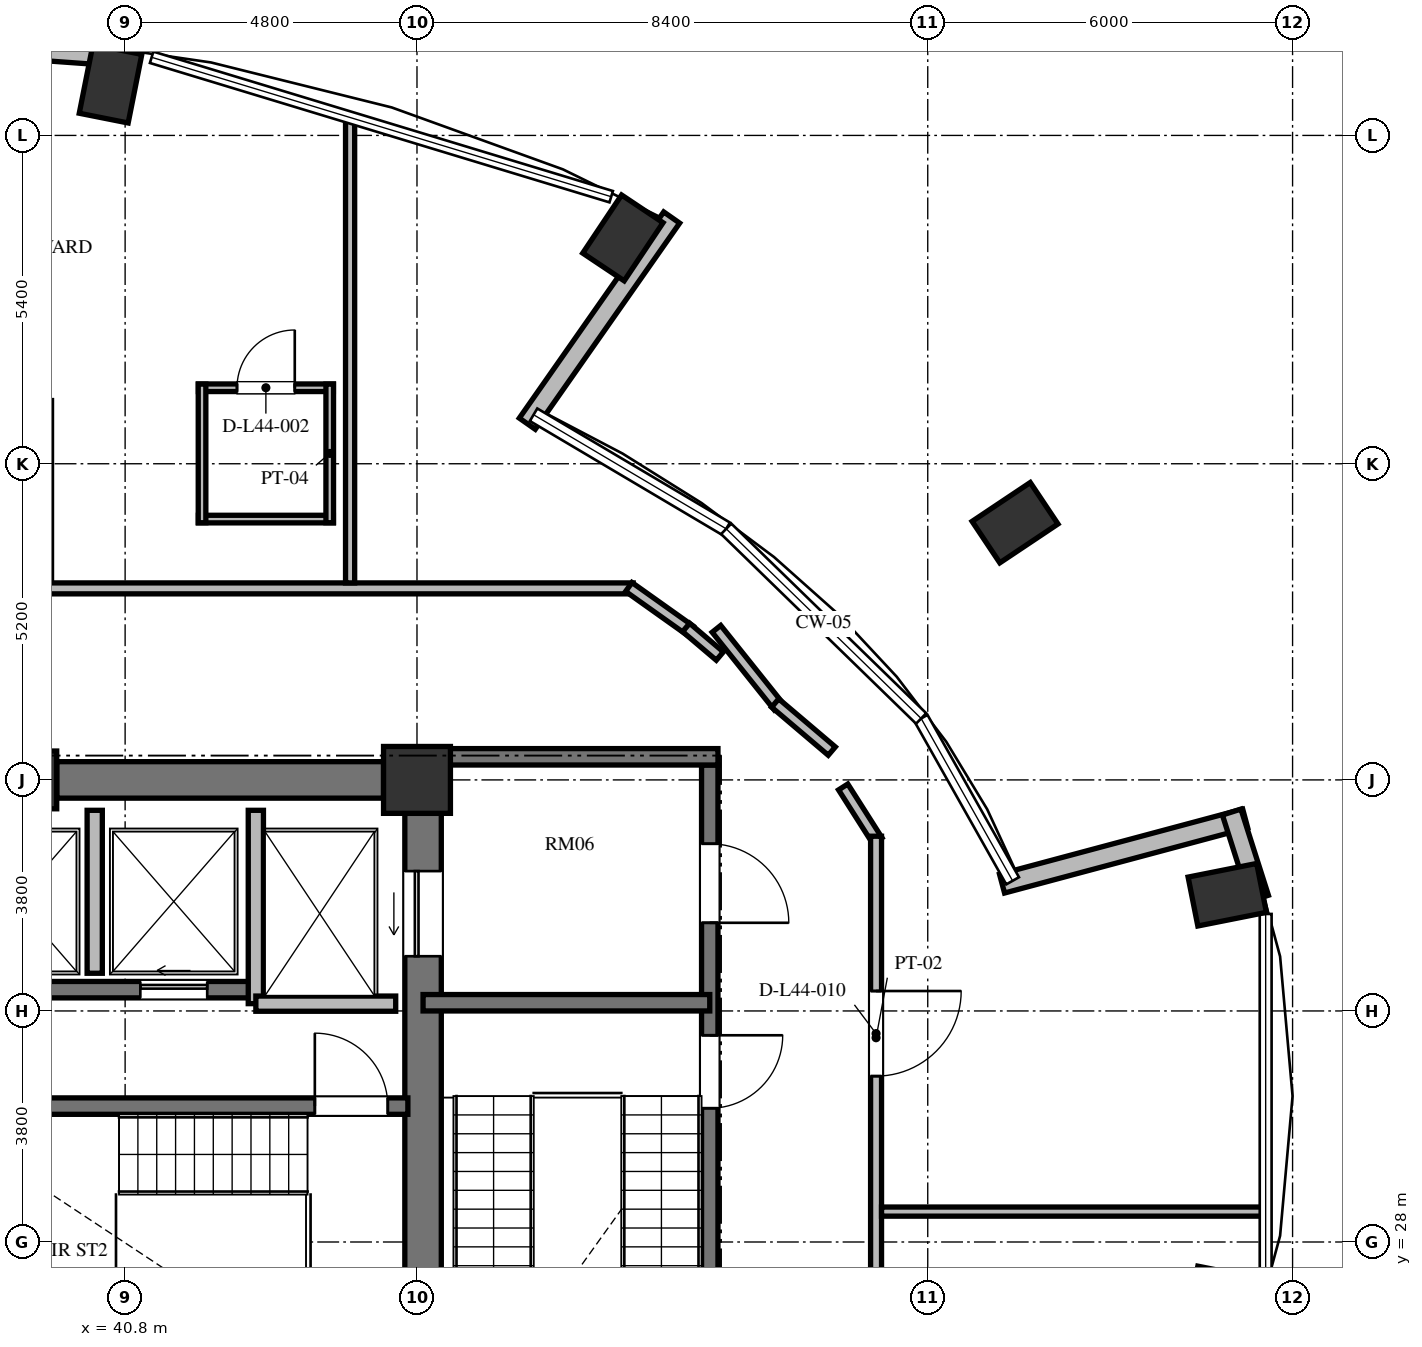
"""IFC4 building model, lengths in metres.
Left out: names, types, materials, properties, quantities, classifications, styles, units other than length and angle.
Written with IfcOpenShell. Run it as: python <this file> out.ifc"""

import sys

from ifc_helpers import new_model, si_unit, direction, frame, frame_2d, origin, origin_2d, place, context, subcontext, project, spatial, rectangle, extrude, element, fill, save


model = new_model("IFC4")
c1 = context("Model", 3, precision=1e-05, world=origin(), true_north=direction((0.0, 1.0)))
c2 = subcontext(c1, "Body", "Model", "MODEL_VIEW")
j1 = project(units=[si_unit("LENGTHUNIT", "METRE"), si_unit("PLANEANGLEUNIT", "RADIAN")], contexts=[c1])
p1 = place(None, origin())
s1 = spatial("IfcSite", under=j1, at=p1, CompositionType="ELEMENT")
p2 = place(p1, origin())
s2 = spatial("IfcBuilding", under=s1, at=p2, CompositionType="ELEMENT")
p3 = place(p2, frame((0.0, 0.0, 171.12)))
s3 = spatial("IfcBuildingStorey", under=s2, at=p3, CompositionType="ELEMENT", Elevation=171.12)
for number, where, z_axis, x_axis in (
    (1, (58.926, 27.088, 0.0), (0.0, 0.0, 1.0), (0.981, -0.195, 0.0)),
    (2, (58.926, 33.712, 0.0), (0.0, 0.0, 1.0), (0.981, 0.195, 0.0)),
    (3, (55.436, 39.831, 0.0), (0.0, 0.0, 1.0), (0.831, 0.556, 0.0)),
    (4, (48.987, 44.514, 0.0), (0.0, 0.0, 1.0), (0.556, 0.831, 0.0)),
    (5, (40.56, 47.049, 0.0), (0.0, 0.0, 1.0), (0.195, 0.981, 0.0)),
):
    element("IfcColumn", number, at=place(p3, frame(where, z_axis=z_axis, x_axis=x_axis)), inside=s3, PredefinedType="COLUMN", context=c2, shape_type="SweptSolid", body=[
        extrude(rectangle(XDim=1.15, YDim=0.82, at=origin_2d()), origin(), (0.0, 0.0, 1.0), 3.648),
    ])
p4 = place(p3, frame((45.6, 35.6, 0.0), z_axis=(0.0, 0.0, 1.0), x_axis=(1.0, 0.0, 0.0)))
e6 = element("IfcColumn", 6, at=p4, inside=s3, PredefinedType="COLUMN", context=c2, shape_type="SweptSolid", body=[
    extrude(rectangle(XDim=1.1, YDim=1.1, at=origin_2d()), origin(), (0.0, 0.0, 1.0), 3.648),
])
p5 = place(p3, frame((39.2, 35.6, 0.0), z_axis=(0.0, 0.0, 1.0), x_axis=(1.0, 0.0, 0.0)))
e7 = element("IfcColumn", 7, at=p5, inside=s3, PredefinedType="COLUMN", context=c2, shape_type="SweptSolid", body=[
    extrude(rectangle(XDim=0.95, YDim=0.95, at=origin_2d()), origin(), (0.0, 0.0, 1.0), 3.648),
])
p6 = place(p3, frame((45.7, 20.95, 0.0), z_axis=(0.0, 0.0, 1.0), x_axis=(0.0, 1.0, 0.0)))
e8 = element("IfcWall", 8, at=p6, inside=s3, PredefinedType="SHEAR", context=c2, shape_type="SweptSolid", body=[
    extrude(rectangle(XDim=14.1, YDim=0.6, at=frame_2d((7.05, 0.0))), origin(), (0.0, 0.0, 1.0), 3.648),
])
p7 = place(p6, frame((11.75, 0.0, 0.0)))
e9 = element("IfcOpeningElement", 9, at=p7, cuts=e8, PredefinedType="OPENING", context=c2, shape_type="SweptSolid", body=[
    extrude(rectangle(XDim=1.4, YDim=2.3, at=frame_2d((0.7, 1.15))), frame((0.0, 0.31, 0.0), z_axis=(0.0, -1.0, 0.0), x_axis=(1.0, 0.0, 0.0)), (0.0, 0.0, 1.0), 0.62),
])
p8 = place(p6, frame((0.95, 0.0, 0.0)))
e10 = element("IfcOpeningElement", 10, at=p8, cuts=e8, PredefinedType="OPENING", context=c2, shape_type="SweptSolid", body=[
    extrude(rectangle(XDim=1.4, YDim=2.3, at=frame_2d((0.7, 1.15))), frame((0.0, 0.31, 0.0), z_axis=(0.0, -1.0, 0.0), x_axis=(1.0, 0.0, 0.0)), (0.0, 0.0, 1.0), 0.62),
])
p9 = place(p3, frame((39.675, 35.6, 0.0), z_axis=(0.0, 0.0, 1.0), x_axis=(1.0, 0.0, 0.0)))
e11 = element("IfcWall", 11, at=p9, inside=s3, PredefinedType="SHEAR", context=c2, shape_type="SweptSolid", body=[
    extrude(rectangle(XDim=5.375, YDim=0.6, at=frame_2d((2.688, 0.0))), origin(), (0.0, 0.0, 1.0), 3.648),
])
p10 = place(p3, frame((40.701, 47.501, 0.0), z_axis=(0.0, 0.0, 1.0), x_axis=(-0.997415460462, 0.071849838072, 0.0)))
e12 = element("IfcWall", 12, at=p10, inside=s3, PredefinedType="SOLIDWALL", context=c2, shape_type="SweptSolid", body=[
    extrude(rectangle(XDim=4.893, YDim=0.32, at=frame_2d((2.447, 0.0))), origin(), (0.0, 0.0, 1.0), 3.428),
])
p11 = place(p10, frame((1.846, 0.0, 0.85)))
e13 = element("IfcOpeningElement", 13, at=p11, cuts=e12, PredefinedType="OPENING", context=c2, shape_type="SweptSolid", body=[
    extrude(rectangle(XDim=1.2, YDim=2.2, at=frame_2d((0.6, 1.1))), frame((0.0, 0.17, 0.0), z_axis=(0.0, -1.0, 0.0), x_axis=(1.0, 0.0, 0.0)), (0.0, 0.0, 1.0), 0.34),
])
p12 = place(p3, frame((59.221, 34.966, 0.0), z_axis=(0.0, 0.0, 1.0), x_axis=(-0.965925940868, -0.258818617489, 0.0)))
e14 = element("IfcWall", 14, at=p12, inside=s3, PredefinedType="SOLIDWALL", context=c2, shape_type="SweptSolid", body=[
    extrude(rectangle(XDim=4.14, YDim=0.32, at=frame_2d((2.07, 0.0))), origin(), (0.0, 0.0, 1.0), 3.428),
])
p13 = place(p3, frame((49.789, 44.85, 0.0), z_axis=(0.0, 0.0, 1.0), x_axis=(-0.57355337011, -0.819168194961, 0.0)))
e15 = element("IfcWall", 15, at=p13, inside=s3, PredefinedType="SOLIDWALL", context=c2, shape_type="SweptSolid", body=[
    extrude(rectangle(XDim=4.14, YDim=0.32, at=frame_2d((2.07, 0.0))), origin(), (0.0, 0.0, 1.0), 2.863),
])
p14 = place(p3, frame((59.45, 33.654, 0.0), z_axis=(0.0, 0.0, 1.0), x_axis=(-0.303745470451, 0.952753215256, 0.0)))
e16 = element("IfcWall", 16, at=p14, inside=s3, PredefinedType="SOLIDWALL", context=c2, shape_type="SweptSolid", body=[
    extrude(rectangle(XDim=1.488, YDim=0.32, at=frame_2d((0.744, 0.0))), origin(), (0.0, 0.0, 1.0), 3.428),
])
p15 = place(p3, frame((37.465, 30.235, 0.0), z_axis=(0.0, 0.0, 1.0), x_axis=(1.0, 0.0, 0.0)))
e17 = element("IfcWall", 17, at=p15, inside=s3, PredefinedType="SHEAR", context=c2, shape_type="SweptSolid", body=[
    extrude(rectangle(XDim=7.985, YDim=0.27, at=frame_2d((3.992, 0.0))), origin(), (0.0, 0.0, 1.0), 3.648),
])
p16 = place(p15, frame((6.455, 0.0, 0.0)))
e18 = element("IfcOpeningElement", 18, at=p16, cuts=e17, PredefinedType="OPENING", context=c2, shape_type="SweptSolid", body=[
    extrude(rectangle(XDim=1.2, YDim=2.15, at=frame_2d((0.6, 1.075))), frame((0.0, 0.145, 0.0), z_axis=(0.0, -1.0, 0.0), x_axis=(1.0, 0.0, 0.0)), (0.0, 0.0, 1.0), 0.29),
])
p17 = place(p3, frame((26.55, 32.15, 0.0), z_axis=(0.0, 0.0, 1.0), x_axis=(1.0, 0.0, 0.0)))
e19 = element("IfcWall", 19, at=p17, inside=s3, PredefinedType="SHEAR", context=c2, shape_type="SweptSolid", body=[
    extrude(rectangle(XDim=16.4, YDim=0.27, at=frame_2d((8.2, 0.0))), origin(), (0.0, 0.0, 1.0), 3.648),
])
p18 = place(p17, frame((2.425, 0.0, 0.0)))
e20 = element("IfcOpeningElement", 20, at=p18, cuts=e19, PredefinedType="OPENING", context=c2, shape_type="SweptSolid", body=[
    extrude(rectangle(XDim=1.05, YDim=2.15, at=frame_2d((0.525, 1.075))), frame((0.0, 0.145, 0.0), z_axis=(0.0, -1.0, 0.0), x_axis=(1.0, 0.0, 0.0)), (0.0, 0.0, 1.0), 0.29),
])
p19 = place(p17, frame((6.5, 0.0, 0.0)))
e21 = element("IfcOpeningElement", 21, at=p19, cuts=e19, PredefinedType="OPENING", context=c2, shape_type="SweptSolid", body=[
    extrude(rectangle(XDim=1.1, YDim=2.2, at=frame_2d((0.55, 1.1))), frame((0.0, 0.145, 0.0), z_axis=(0.0, -1.0, 0.0), x_axis=(1.0, 0.0, 0.0)), (0.0, 0.0, 1.0), 0.29),
])
p20 = place(p17, frame((9.1, 0.0, 0.0)))
e22 = element("IfcOpeningElement", 22, at=p20, cuts=e19, PredefinedType="OPENING", context=c2, shape_type="SweptSolid", body=[
    extrude(rectangle(XDim=1.1, YDim=2.2, at=frame_2d((0.55, 1.1))), frame((0.0, 0.145, 0.0), z_axis=(0.0, -1.0, 0.0), x_axis=(1.0, 0.0, 0.0)), (0.0, 0.0, 1.0), 0.29),
])
p21 = place(p17, frame((11.9, 0.0, 0.0)))
e23 = element("IfcOpeningElement", 23, at=p21, cuts=e19, PredefinedType="OPENING", context=c2, shape_type="SweptSolid", body=[
    extrude(rectangle(XDim=1.1, YDim=2.2, at=frame_2d((0.55, 1.1))), frame((0.0, 0.145, 0.0), z_axis=(0.0, -1.0, 0.0), x_axis=(1.0, 0.0, 0.0)), (0.0, 0.0, 1.0), 0.29),
])
p22 = place(p17, frame((14.5, 0.0, 0.0)))
e24 = element("IfcOpeningElement", 24, at=p22, cuts=e19, PredefinedType="OPENING", context=c2, shape_type="SweptSolid", body=[
    extrude(rectangle(XDim=1.1, YDim=2.2, at=frame_2d((0.55, 1.1))), frame((0.0, 0.145, 0.0), z_axis=(0.0, -1.0, 0.0), x_axis=(1.0, 0.0, 0.0)), (0.0, 0.0, 1.0), 0.29),
])
p23 = place(p3, frame((42.95, 31.92, 0.0), z_axis=(0.0, 0.0, 1.0), x_axis=(0.0, 1.0, 0.0)))
e25 = element("IfcWall", 25, at=p23, inside=s3, PredefinedType="SOLIDWALL", context=c2, shape_type="SweptSolid", body=[
    extrude(rectangle(XDim=3.18, YDim=0.25, at=frame_2d((1.59, 0.0))), origin(), (0.0, 0.0, 1.0), 3.428),
])
p24 = place(p3, frame((42.95, 31.92, 0.0), z_axis=(0.0, 0.0, 1.0), x_axis=(1.0, 0.0, 0.0)))
e26 = element("IfcWall", 26, at=p24, inside=s3, PredefinedType="SOLIDWALL", context=c2, shape_type="SweptSolid", body=[
    extrude(rectangle(XDim=2.3, YDim=0.25, at=frame_2d((1.15, 0.0))), origin(), (0.0, 0.0, 1.0), 3.428),
])
p25 = place(p3, frame((40.3, 32.42, 0.0), z_axis=(0.0, 0.0, 1.0), x_axis=(0.0, 1.0, 0.0)))
e27 = element("IfcWall", 27, at=p25, inside=s3, PredefinedType="SOLIDWALL", context=c2, shape_type="SweptSolid", body=[
    extrude(rectangle(XDim=2.68, YDim=0.25, at=frame_2d((1.34, 0.0))), origin(), (0.0, 0.0, 1.0), 3.428),
])
p26 = place(p3, frame((50.415, 35.845, 0.0), z_axis=(0.0, 0.0, 1.0), x_axis=(0.0, -1.0, 0.0)))
e28 = element("IfcWall", 28, at=p26, inside=s3, PredefinedType="SHEAR", context=c2, shape_type="SweptSolid", body=[
    extrude(rectangle(XDim=15.825, YDim=0.27, at=frame_2d((7.913, 0.0))), origin(), (0.0, 0.0, 1.0), 3.648),
])
p27 = place(p26, frame((4.445, 0.0, 0.0)))
e29 = element("IfcOpeningElement", 29, at=p27, cuts=e28, PredefinedType="OPENING", context=c2, shape_type="SweptSolid", body=[
    extrude(rectangle(XDim=1.2, YDim=2.15, at=frame_2d((0.6, 1.075))), frame((0.0, 0.145, 0.0), z_axis=(0.0, -1.0, 0.0), x_axis=(1.0, 0.0, 0.0)), (0.0, 0.0, 1.0), 0.29),
])
p28 = place(p26, frame((1.295, 0.0, 0.0)))
e30 = element("IfcOpeningElement", 30, at=p28, cuts=e28, PredefinedType="OPENING", context=c2, shape_type="SweptSolid", body=[
    extrude(rectangle(XDim=1.3, YDim=2.2, at=frame_2d((0.65, 1.1))), frame((0.0, 0.145, 0.0), z_axis=(0.0, -1.0, 0.0), x_axis=(1.0, 0.0, 0.0)), (0.0, 0.0, 1.0), 0.29),
])
p29 = place(p26, frame((13.095, 0.0, 0.0)))
e31 = element("IfcOpeningElement", 31, at=p29, cuts=e28, PredefinedType="OPENING", context=c2, shape_type="SweptSolid", body=[
    extrude(rectangle(XDim=1.3, YDim=2.2, at=frame_2d((0.65, 1.1))), frame((0.0, 0.145, 0.0), z_axis=(0.0, -1.0, 0.0), x_axis=(1.0, 0.0, 0.0)), (0.0, 0.0, 1.0), 0.29),
])
p30 = place(p3, frame((46.0, 35.98, 0.0), z_axis=(0.0, 0.0, 1.0), x_axis=(1.0, 0.0, 0.0)))
e32 = element("IfcWall", 32, at=p30, inside=s3, PredefinedType="SHEAR", context=c2, shape_type="SweptSolid", body=[
    extrude(rectangle(XDim=4.55, YDim=0.27, at=frame_2d((2.275, 0.0))), origin(), (0.0, 0.0, 1.0), 3.648),
])
p31 = place(p3, frame((45.7, 31.935, 0.0), z_axis=(0.0, 0.0, 1.0), x_axis=(1.0, 0.0, 0.0)))
e33 = element("IfcWall", 33, at=p31, inside=s3, PredefinedType="SHEAR", context=c2, shape_type="SweptSolid", body=[
    extrude(rectangle(XDim=4.715, YDim=0.27, at=frame_2d((2.357, 0.0))), origin(), (0.0, 0.0, 1.0), 3.648),
])
p32 = place(p3, frame((39.46, 38.75, 0.0), z_axis=(0.0, 0.0, 1.0), x_axis=(1.0, 0.0, 0.0)))
e34 = element("IfcWall", 34, at=p32, inside=s3, PredefinedType="PARTITIONING", context=c2, shape_type="SweptSolid", body=[
    extrude(rectangle(XDim=9.696, YDim=0.18, at=frame_2d((4.848, 0.0))), origin(), (0.0, 0.0, 1.0), 3.428),
])
p33 = place(p3, frame((49.083, 38.773, 0.0), z_axis=(0.0, 0.0, 1.0), x_axis=(0.815094383649, -0.579328184835, 0.0)))
e35 = element("IfcWall", 35, at=p33, inside=s3, PredefinedType="PARTITIONING", context=c2, shape_type="SweptSolid", body=[
    extrude(rectangle(XDim=1.234, YDim=0.18, at=frame_2d((0.617, 0.0))), origin(), (0.0, 0.0, 1.0), 3.428),
])
p34 = place(p3, frame((50.026, 38.107, 0.0), z_axis=(0.0, 0.0, 1.0), x_axis=(0.762519178552, -0.646965611405, 0.0)))
e36 = element("IfcWall", 36, at=p34, inside=s3, PredefinedType="PARTITIONING", context=c2, shape_type="SweptSolid", body=[
    extrude(rectangle(XDim=0.727, YDim=0.18, at=frame_2d((0.363, 0.0))), origin(), (0.0, 0.0, 1.0), 3.428),
])
p35 = place(p3, frame((50.525, 38.085, 0.0), z_axis=(0.0, 0.0, 1.0), x_axis=(0.624367263629, -0.781130923794, 0.0)))
e37 = element("IfcWall", 37, at=p35, inside=s3, PredefinedType="PARTITIONING", context=c2, shape_type="SweptSolid", body=[
    extrude(rectangle(XDim=1.635, YDim=0.18, at=frame_2d((0.818, 0.0))), origin(), (0.0, 0.0, 1.0), 3.428),
])
p36 = place(p3, frame((51.49, 36.865, 0.0), z_axis=(0.0, 0.0, 1.0), x_axis=(0.762506147444, -0.646980969666, 0.0)))
e38 = element("IfcWall", 38, at=p36, inside=s3, PredefinedType="PARTITIONING", context=c2, shape_type="SweptSolid", body=[
    extrude(rectangle(XDim=1.221, YDim=0.18, at=frame_2d((0.611, 0.0))), origin(), (0.0, 0.0, 1.0), 3.428),
])
p37 = place(p3, frame((52.609, 35.484, 0.0), z_axis=(0.0, 0.0, 1.0), x_axis=(0.536664379082, -0.843795795335, 0.0)))
e39 = element("IfcWall", 39, at=p37, inside=s3, PredefinedType="PARTITIONING", context=c2, shape_type="SweptSolid", body=[
    extrude(rectangle(XDim=1.048, YDim=0.18, at=frame_2d((0.524, 0.0))), origin(), (0.0, 0.0, 1.0), 3.428),
])
p38 = place(p3, frame((53.15, 34.674, 0.0), z_axis=(0.0, 0.0, 1.0), x_axis=(0.0, -1.0, 0.0)))
e40 = element("IfcWall", 40, at=p38, inside=s3, PredefinedType="PARTITIONING", context=c2, shape_type="SweptSolid", body=[
    extrude(rectangle(XDim=13.258, YDim=0.18, at=frame_2d((6.629, 0.0))), origin(), (0.0, 0.0, 1.0), 3.428),
])
p39 = place(p38, frame((8.857, 0.0, 0.0)))
e41 = element("IfcOpeningElement", 41, at=p39, cuts=e40, PredefinedType="OPENING", context=c2, shape_type="SweptSolid", body=[
    extrude(rectangle(XDim=1.4, YDim=2.2, at=frame_2d((0.7, 1.1))), frame((0.0, 0.1, 0.0), z_axis=(0.0, -1.0, 0.0), x_axis=(1.0, 0.0, 0.0)), (0.0, 0.0, 1.0), 0.2),
])
p40 = place(p38, frame((2.546, 0.0, 0.0)))
e42 = element("IfcOpeningElement", 42, at=p40, cuts=e40, PredefinedType="OPENING", context=c2, shape_type="SweptSolid", body=[
    extrude(rectangle(XDim=1.4, YDim=2.2, at=frame_2d((0.7, 1.1))), frame((0.0, 0.1, 0.0), z_axis=(0.0, -1.0, 0.0), x_axis=(1.0, 0.0, 0.0)), (0.0, 0.0, 1.0), 0.2),
])
p41 = place(p3, frame((53.24, 28.5, 0.0), z_axis=(0.0, 0.0, 1.0), x_axis=(1.0, 0.0, 0.0)))
e43 = element("IfcWall", 43, at=p41, inside=s3, PredefinedType="PARTITIONING", context=c2, shape_type="SweptSolid", body=[
    extrude(rectangle(XDim=6.307, YDim=0.15, at=frame_2d((3.154, 0.0))), origin(), (0.0, 0.0, 1.0), 3.428),
])
p42 = place(p3, frame((44.5, 38.84, 0.0), z_axis=(0.0, 0.0, 1.0), x_axis=(0.0, 1.0, 0.0)))
e44 = element("IfcWall", 44, at=p42, inside=s3, PredefinedType="PARTITIONING", context=c2, shape_type="SweptSolid", body=[
    extrude(rectangle(XDim=7.639, YDim=0.15, at=frame_2d((3.82, 0.0))), origin(), (0.0, 0.0, 1.0), 3.428),
])
p43 = place(p3, frame((42.005, 42.05, 0.0), z_axis=(0.0, 0.0, 1.0), x_axis=(1.0, 0.0, 0.0)))
e45 = element("IfcWall", 45, at=p43, inside=s3, PredefinedType="PARTITIONING", context=c2, shape_type="SweptSolid", body=[
    extrude(rectangle(XDim=2.22, YDim=0.125, at=frame_2d((1.11, 0.0))), origin(), (0.0, 0.0, 1.0), 3.428),
])
p44 = place(p43, frame((0.635, 0.0, 0.0)))
e46 = element("IfcOpeningElement", 46, at=p44, cuts=e45, PredefinedType="OPENING", context=c2, shape_type="SweptSolid", body=[
    extrude(rectangle(XDim=0.95, YDim=2.1, at=frame_2d((0.475, 1.05))), frame((0.0, 0.073, 0.0), z_axis=(0.0, -1.0, 0.0), x_axis=(1.0, 0.0, 0.0)), (0.0, 0.0, 1.0), 0.145),
])
p45 = place(p3, frame((42.005, 39.89, 0.0), z_axis=(0.0, 0.0, 1.0), x_axis=(1.0, 0.0, 0.0)))
e47 = element("IfcWall", 47, at=p45, inside=s3, PredefinedType="PARTITIONING", context=c2, shape_type="SweptSolid", body=[
    extrude(rectangle(XDim=2.22, YDim=0.125, at=frame_2d((1.11, 0.0))), origin(), (0.0, 0.0, 1.0), 3.053),
])
for number, where, z_axis, x_axis in (
    (48, (44.165, 39.83, 0.0), (0.0, 0.0, 1.0), (0.0, 1.0, 0.0)),
    (49, (42.065, 39.83, 0.0), (0.0, 0.0, 1.0), (0.0, 1.0, 0.0)),
):
    element("IfcWall", number, at=place(p3, frame(where, z_axis=z_axis, x_axis=x_axis)), inside=s3, PredefinedType="PARTITIONING", context=c2, shape_type="SweptSolid", body=[
        extrude(rectangle(XDim=2.28, YDim=0.125, at=frame_2d((1.14, 0.0))), origin(), (0.0, 0.0, 1.0), 3.428),
    ])
p46 = place(p16, origin())
e50 = element("IfcDoor", 50, at=p46, inside=s3, OperationType="SINGLE_SWING_LEFT", PredefinedType="DOOR", context=c2, shape_type="SweptSolid", body=[
    extrude(rectangle(XDim=1.2, YDim=2.15, at=frame_2d((0.6, 1.075))), frame((0.0, 0.025, 0.0), z_axis=(0.0, -1.0, 0.0), x_axis=(1.0, 0.0, 0.0)), (0.0, 0.0, 1.0), 0.05),
])
fill(e18, e50)
p47 = place(p22, origin())
e51 = element("IfcDoor", 51, at=p47, inside=s3, OperationType="SLIDING_TO_LEFT", PredefinedType="DOOR", context=c2, shape_type="SweptSolid", body=[
    extrude(rectangle(XDim=1.1, YDim=2.2, at=frame_2d((0.55, 1.1))), frame((0.0, 0.025, 0.0), z_axis=(0.0, -1.0, 0.0), x_axis=(1.0, 0.0, 0.0)), (0.0, 0.0, 1.0), 0.05),
])
fill(e24, e51)
p48 = place(p7, origin())
e52 = element("IfcDoor", 52, at=p48, inside=s3, OperationType="SLIDING_TO_LEFT", PredefinedType="DOOR", context=c2, shape_type="SweptSolid", body=[
    extrude(rectangle(XDim=1.4, YDim=2.3, at=frame_2d((0.7, 1.15))), frame((0.0, 0.025, 0.0), z_axis=(0.0, -1.0, 0.0), x_axis=(1.0, 0.0, 0.0)), (0.0, 0.0, 1.0), 0.05),
])
fill(e9, e52)
p49 = place(p27, origin())
e53 = element("IfcDoor", 53, at=p49, inside=s3, OperationType="SINGLE_SWING_LEFT", PredefinedType="DOOR", context=c2, shape_type="SweptSolid", body=[
    extrude(rectangle(XDim=1.2, YDim=2.15, at=frame_2d((0.6, 1.075))), frame((0.0, 0.025, 0.0), z_axis=(0.0, -1.0, 0.0), x_axis=(1.0, 0.0, 0.0)), (0.0, 0.0, 1.0), 0.05),
])
fill(e29, e53)
p50 = place(p28, origin())
e54 = element("IfcDoor", 54, at=p50, inside=s3, OperationType="SINGLE_SWING_RIGHT", PredefinedType="DOOR", context=c2, shape_type="SweptSolid", body=[
    extrude(rectangle(XDim=1.3, YDim=2.2, at=frame_2d((0.65, 1.1))), frame((0.0, 0.025, 0.0), z_axis=(0.0, -1.0, 0.0), x_axis=(1.0, 0.0, 0.0)), (0.0, 0.0, 1.0), 0.05),
])
fill(e30, e54)
p51 = place(p40, origin())
e55 = element("IfcDoor", 55, at=p51, inside=s3, OperationType="SINGLE_SWING_LEFT", PredefinedType="DOOR", context=c2, shape_type="SweptSolid", body=[
    extrude(rectangle(XDim=1.4, YDim=2.2, at=frame_2d((0.7, 1.1))), frame((0.0, 0.025, 0.0), z_axis=(0.0, -1.0, 0.0), x_axis=(1.0, 0.0, 0.0)), (0.0, 0.0, 1.0), 0.05),
])
fill(e42, e55)
p52 = place(p44, origin())
e56 = element("IfcDoor", 56, at=p52, inside=s3, OperationType="SINGLE_SWING_RIGHT", PredefinedType="DOOR", context=c2, shape_type="SweptSolid", body=[
    extrude(rectangle(XDim=0.95, YDim=2.1, at=frame_2d((0.475, 1.05))), frame((0.0, 0.025, 0.0), z_axis=(0.0, -1.0, 0.0), x_axis=(1.0, 0.0, 0.0)), (0.0, 0.0, 1.0), 0.05),
])
fill(e46, e56)
save(model, sys.argv[1])
